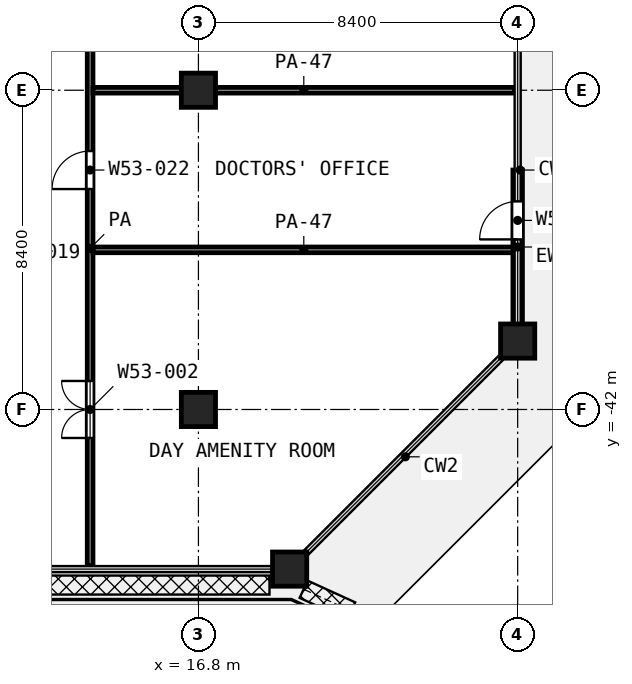
"""IFC4 building model, lengths in metres.
Left out: names, types, materials, properties, quantities, classifications, styles, units other than length and angle.
Written with IfcOpenShell. Run it as: python <this file> out.ifc"""

import sys

from ifc_helpers import new_model, si_unit, direction, frame, frame_2d, origin, origin_2d, place, context, subcontext, project, spatial, rectangle, extrude, element, fill, save


model = new_model("IFC4")
c1 = context("Model", 3, precision=1e-05, world=origin(), true_north=direction((0.0, 1.0)))
c2 = subcontext(c1, "Body", "Model", "MODEL_VIEW")
j1 = project(units=[si_unit("LENGTHUNIT", "METRE"), si_unit("PLANEANGLEUNIT", "RADIAN")], contexts=[c1])
p1 = place(None, origin())
s1 = spatial("IfcSite", under=j1, at=p1, CompositionType="ELEMENT")
p2 = place(p1, origin())
s2 = spatial("IfcBuilding", under=s1, at=p2, CompositionType="ELEMENT")
p3 = place(p2, frame((0.0, 0.0, 251.6)))
s3 = spatial("IfcBuildingStorey", under=s2, at=p3, CompositionType="ELEMENT", Elevation=251.6)
for number, where, z_axis, x_axis in (
    (1, (16.8, -33.6, 0.0), (0.0, 0.0, 1.0), (1.0, 0.0, 0.0)),
    (2, (25.2, -40.2, 0.0), (0.0, 0.0, 1.0), (1.0, 0.0, 0.0)),
    (3, (16.8, -42.0, 0.0), (0.0, 0.0, 1.0), (1.0, 0.0, 0.0)),
    (4, (19.2, -46.2, 0.0), (0.0, 0.0, 1.0), (1.0, 0.0, 0.0)),
):
    element("IfcColumn", number, at=place(p3, frame(where, z_axis=z_axis, x_axis=x_axis)), inside=s3, PredefinedType="COLUMN", context=c2, shape_type="SweptSolid", body=[
        extrude(rectangle(XDim=0.9, YDim=0.9, at=origin_2d()), origin(), (0.0, 0.0, 1.0), 4.2),
    ])
p4 = place(p3, frame((25.2, -39.75, 0.0), z_axis=(0.0, 0.0, 1.0), x_axis=(0.0, 1.0, 0.0)))
e5 = element("IfcWall", 5, at=p4, inside=s3, PredefinedType="SOLIDWALL", context=c2, shape_type="SweptSolid", body=[
    extrude(rectangle(XDim=4.05, YDim=0.25, at=frame_2d((2.025, 0.0))), origin(), (0.0, 0.0, 1.0), 2.58),
])
p5 = place(p4, frame((2.225, 0.0, 0.0)))
e6 = element("IfcOpeningElement", 6, at=p5, cuts=e5, PredefinedType="OPENING", context=c2, shape_type="SweptSolid", body=[
    extrude(rectangle(XDim=1.0, YDim=2.1, at=frame_2d((0.5, 1.05))), frame((0.0, 0.135, 0.0), z_axis=(0.0, -1.0, 0.0), x_axis=(1.0, 0.0, 0.0)), (0.0, 0.0, 1.0), 0.27),
])
for number, where, z_axis, x_axis in (
    (7, (14.025, -37.8, 0.0), (0.0, 0.0, 1.0), (1.0, 0.0, 0.0)),
    (8, (14.025, -33.6, 0.0), (0.0, 0.0, 1.0), (1.0, 0.0, 0.0)),
):
    element("IfcWall", number, at=place(p3, frame(where, z_axis=z_axis, x_axis=x_axis)), inside=s3, PredefinedType="PARTITIONING", context=c2, shape_type="SweptSolid", body=[
        extrude(rectangle(XDim=11.095, YDim=0.15, at=frame_2d((5.548, 0.0))), origin(), (0.0, 0.0, 1.0), 2.7),
    ])
p6 = place(p3, frame((13.95, -46.12, 0.0), z_axis=(0.0, 0.0, 1.0), x_axis=(0.0, 1.0, 0.0)))
e9 = element("IfcWall", 9, at=p6, inside=s3, PredefinedType="PARTITIONING", context=c2, shape_type="SweptSolid", body=[
    extrude(rectangle(XDim=16.72, YDim=0.15, at=frame_2d((8.36, 0.0))), origin(), (0.0, 0.0, 1.0), 3.6),
])
p7 = place(p6, frame((14.12, 0.0, 0.0)))
e10 = element("IfcOpeningElement", 10, at=p7, cuts=e9, PredefinedType="OPENING", context=c2, shape_type="SweptSolid", body=[
    extrude(rectangle(XDim=1.0, YDim=2.1, at=frame_2d((0.5, 1.05))), frame((0.0, 0.085, 0.0), z_axis=(0.0, -1.0, 0.0), x_axis=(1.0, 0.0, 0.0)), (0.0, 0.0, 1.0), 0.17),
])
p8 = place(p6, frame((9.92, 0.0, 0.0)))
e11 = element("IfcOpeningElement", 11, at=p8, cuts=e9, PredefinedType="OPENING", context=c2, shape_type="SweptSolid", body=[
    extrude(rectangle(XDim=1.0, YDim=2.1, at=frame_2d((0.5, 1.05))), frame((0.0, 0.085, 0.0), z_axis=(0.0, -1.0, 0.0), x_axis=(1.0, 0.0, 0.0)), (0.0, 0.0, 1.0), 0.17),
])
p9 = place(p6, frame((3.37, 0.0, 0.0)))
e12 = element("IfcOpeningElement", 12, at=p9, cuts=e9, PredefinedType="OPENING", context=c2, shape_type="SweptSolid", body=[
    extrude(rectangle(XDim=1.5, YDim=2.1, at=frame_2d((0.75, 1.05))), frame((0.0, 0.085, 0.0), z_axis=(0.0, -1.0, 0.0), x_axis=(1.0, 0.0, 0.0)), (0.0, 0.0, 1.0), 0.17),
])
p10 = place(p5, origin())
e13 = element("IfcDoor", 13, at=p10, inside=s3, OperationType="SINGLE_SWING_LEFT", PredefinedType="DOOR", context=c2, shape_type="SweptSolid", body=[
    extrude(rectangle(XDim=1.0, YDim=2.1, at=frame_2d((0.5, 1.05))), frame((0.0, 0.025, 0.0), z_axis=(0.0, -1.0, 0.0), x_axis=(1.0, 0.0, 0.0)), (0.0, 0.0, 1.0), 0.05),
])
fill(e6, e13)
p11 = place(p8, origin())
e14 = element("IfcDoor", 14, at=p11, inside=s3, OperationType="SINGLE_SWING_LEFT", PredefinedType="DOOR", context=c2, shape_type="SweptSolid", body=[
    extrude(rectangle(XDim=1.0, YDim=2.1, at=frame_2d((0.5, 1.05))), frame((0.0, 0.025, 0.0), z_axis=(0.0, -1.0, 0.0), x_axis=(1.0, 0.0, 0.0)), (0.0, 0.0, 1.0), 0.05),
])
fill(e11, e14)
p12 = place(p9, origin())
e15 = element("IfcDoor", 15, at=p12, inside=s3, OperationType="DOUBLE_DOOR_SINGLE_SWING", PredefinedType="DOOR", context=c2, shape_type="SweptSolid", body=[
    extrude(rectangle(XDim=1.5, YDim=2.1, at=frame_2d((0.75, 1.05))), frame((0.0, 0.025, 0.0), z_axis=(0.0, -1.0, 0.0), x_axis=(1.0, 0.0, 0.0)), (0.0, 0.0, 1.0), 0.05),
])
fill(e12, e15)
save(model, sys.argv[1])
